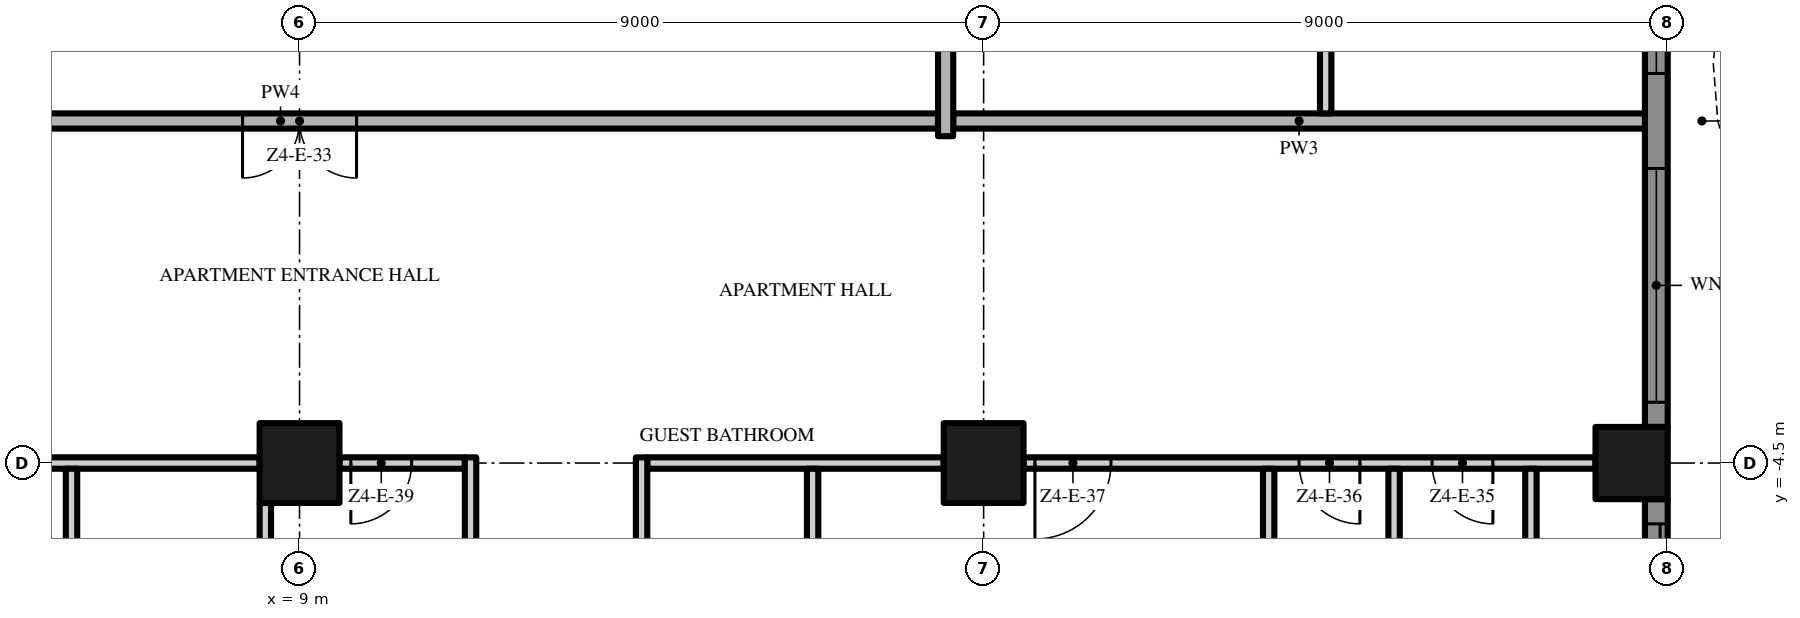
"""IFC4 building model, lengths in metres.
Left out: names, types, materials, properties, quantities, classifications, styles, units other than length and angle.
Written with IfcOpenShell. Run it as: python <this file> out.ifc"""

import sys

from ifc_helpers import new_model, si_unit, direction, frame, frame_2d, origin, origin_2d, place, context, subcontext, project, spatial, polyline, rectangle, outline, extrude, element, fill, save


model = new_model("IFC4")
c1 = context("Model", 3, precision=1e-05, world=origin(), true_north=direction((0.0, 1.0)))
c2 = subcontext(c1, "Body", "Model", "MODEL_VIEW")
j1 = project(units=[si_unit("LENGTHUNIT", "METRE"), si_unit("PLANEANGLEUNIT", "RADIAN")], contexts=[c1])
p1 = place(None, origin())
s1 = spatial("IfcSite", under=j1, at=p1, CompositionType="ELEMENT")
p2 = place(p1, origin())
s2 = spatial("IfcBuilding", under=s1, at=p2, CompositionType="ELEMENT")
p3 = place(p2, frame((0.0, 0.0, 226.2)))
s3 = spatial("IfcBuildingStorey", under=s2, at=p3, CompositionType="ELEMENT", Elevation=226.2)
p4 = place(p3, frame((18.0, -4.5, 0.0), z_axis=(0.0, 0.0, 1.0), x_axis=(1.0, 0.0, 0.0)))
e1 = element("IfcColumn", 1, at=p4, inside=s3, PredefinedType="COLUMN", context=c2, shape_type="SweptSolid", body=[
    extrude(rectangle(XDim=1.05, YDim=1.05, at=origin_2d()), origin(), (0.0, 0.0, 1.0), 3.5),
])
p5 = place(p3, frame((26.525, -4.5, 0.0), z_axis=(0.0, 0.0, 1.0), x_axis=(1.0, 0.0, 0.0)))
e2 = element("IfcColumn", 2, at=p5, inside=s3, PredefinedType="COLUMN", context=c2, shape_type="SweptSolid", body=[
    extrude(rectangle(XDim=0.95, YDim=0.95, at=origin_2d()), origin(), (0.0, 0.0, 1.0), 3.5),
])
p6 = place(p3, frame((9.0, -4.5, 0.0), z_axis=(0.0, 0.0, 1.0), x_axis=(1.0, 0.0, 0.0)))
e3 = element("IfcColumn", 3, at=p6, inside=s3, PredefinedType="COLUMN", context=c2, shape_type="SweptSolid", body=[
    extrude(rectangle(XDim=1.05, YDim=1.05, at=origin_2d()), origin(), (0.0, 0.0, 1.0), 3.5),
])
p7 = place(p3, frame((26.85, -4.975, 0.0), z_axis=(0.0, 0.0, 1.0), x_axis=(0.0, -1.0, 0.0)))
e4 = element("IfcWall", 4, at=p7, inside=s3, PredefinedType="SOLIDWALL", context=c2, shape_type="SweptSolid", body=[
    extrude(rectangle(XDim=8.05, YDim=0.3, at=frame_2d((4.025, 0.0))), origin(), (0.0, 0.0, 1.0), 3.5),
])
p8 = place(p7, frame((4.65, 0.0, 0.45)))
e5 = element("IfcOpeningElement", 5, at=p8, cuts=e4, PredefinedType="OPENING", context=c2, shape_type="SweptSolid", body=[
    extrude(rectangle(XDim=3.075, YDim=2.65, at=frame_2d((1.538, 1.325))), frame((0.0, 0.16, 0.0), z_axis=(0.0, -1.0, 0.0), x_axis=(1.0, 0.0, 0.0)), (0.0, 0.0, 1.0), 0.32),
])
p9 = place(p7, frame((0.325, 0.0, 0.0)))
e6 = element("IfcOpeningElement", 6, at=p9, cuts=e4, PredefinedType="OPENING", context=c2, shape_type="SweptSolid", body=[
    extrude(rectangle(XDim=3.075, YDim=2.4, at=frame_2d((1.538, 1.2))), frame((0.0, 0.16, 0.0), z_axis=(0.0, -1.0, 0.0), x_axis=(1.0, 0.0, 0.0)), (0.0, 0.0, 1.0), 0.32),
])
p10 = place(p3, frame((26.85, 4.025, 0.0), z_axis=(0.0, 0.0, 1.0), x_axis=(0.0, -1.0, 0.0)))
e7 = element("IfcWall", 7, at=p10, inside=s3, PredefinedType="SOLIDWALL", context=c2, shape_type="SweptSolid", body=[
    extrude(rectangle(XDim=8.05, YDim=0.3, at=frame_2d((4.025, 0.0))), origin(), (0.0, 0.0, 1.0), 3.5),
])
p11 = place(p10, frame((4.65, 0.0, 0.45)))
e8 = element("IfcOpeningElement", 8, at=p11, cuts=e7, PredefinedType="OPENING", context=c2, shape_type="SweptSolid", body=[
    extrude(rectangle(XDim=3.075, YDim=2.65, at=frame_2d((1.538, 1.325))), frame((0.0, 0.16, 0.0), z_axis=(0.0, -1.0, 0.0), x_axis=(1.0, 0.0, 0.0)), (0.0, 0.0, 1.0), 0.32),
])
p12 = place(p10, frame((0.325, 0.0, 0.45)))
e9 = element("IfcOpeningElement", 9, at=p12, cuts=e7, PredefinedType="OPENING", context=c2, shape_type="SweptSolid", body=[
    extrude(rectangle(XDim=3.075, YDim=2.65, at=frame_2d((1.538, 1.325))), frame((0.0, 0.16, 0.0), z_axis=(0.0, -1.0, 0.0), x_axis=(1.0, 0.0, 0.0)), (0.0, 0.0, 1.0), 0.32),
])
p13 = place(p3, origin())
e10 = element("IfcWall", 10, at=p13, inside=s3, PredefinedType="USERDEFINED", context=c2, shape_type="SweptSolid", body=[
    extrude(outline(polyline([(28.8, -18.0), (28.095, -16.5), (27.659, -15.0), (27.6, -14.25), (27.659, -13.5), (28.095, -12.0), (28.8, -10.5), (29.505, -9.0), (29.941, -7.5), (30.0, -6.75), (29.941, -6.0), (29.505, -4.5), (28.8, -3.0), (28.095, -1.5), (27.659, 0.0), (27.6, 0.75), (27.659, 1.5), (28.095, 3.0), (28.8, 4.5), (29.505, 6.0), (29.941, 7.5), (30.0, 8.25), (29.941, 9.0), (29.505, 10.5), (28.8, 12.0), (28.095, 13.5), (27.659, 15.0), (27.6, 15.75), (27.659, 16.5), (28.095, 18.0), (27.855, 18.07), (27.411, 16.545), (27.349, 15.75), (27.411, 14.955), (27.86, 13.411), (28.574, 11.894), (29.271, 10.411), (29.694, 8.955), (29.749, 8.25), (29.694, 7.545), (29.271, 6.089), (28.574, 4.606), (27.86, 3.089), (27.411, 1.545), (27.349, 0.75), (27.411, -0.045), (27.86, -1.589), (28.574, -3.106), (29.271, -4.589), (29.694, -6.045), (29.749, -6.75), (29.694, -7.455), (29.271, -8.911), (28.574, -10.394), (27.86, -11.911), (27.411, -13.455), (27.349, -14.25), (27.411, -15.045), (27.86, -16.589), (28.574, -18.106), (28.8, -18.0)])), origin(), (0.0, 0.0, 1.0), 0.9),
])
p14 = place(p3, frame((8.475, -4.5, 0.0), z_axis=(0.0, 0.0, 1.0), x_axis=(-1.0, 0.0, 0.0)))
e11 = element("IfcWall", 11, at=p14, inside=s3, PredefinedType="PARTITIONING", context=c2, shape_type="SweptSolid", body=[
    extrude(rectangle(XDim=7.95, YDim=0.15, at=frame_2d((3.975, 0.0))), origin(), (0.0, 0.0, 1.0), 3.5),
])
p15 = place(p14, frame((3.575, 0.0, 0.0)))
e12 = element("IfcOpeningElement", 12, at=p15, cuts=e11, PredefinedType="OPENING", context=c2, shape_type="SweptSolid", body=[
    extrude(rectangle(XDim=0.8, YDim=2.0, at=frame_2d((0.4, 1.0))), frame((0.0, 0.085, 0.0), z_axis=(0.0, -1.0, 0.0), x_axis=(1.0, 0.0, 0.0)), (0.0, 0.0, 1.0), 0.17),
])
p16 = place(p14, frame((6.55, 0.0, 0.0)))
e13 = element("IfcOpeningElement", 13, at=p16, cuts=e11, PredefinedType="OPENING", context=c2, shape_type="SweptSolid", body=[
    extrude(rectangle(XDim=0.9, YDim=2.1, at=frame_2d((0.45, 1.05))), frame((0.0, 0.085, 0.0), z_axis=(0.0, -1.0, 0.0), x_axis=(1.0, 0.0, 0.0)), (0.0, 0.0, 1.0), 0.17),
])
p17 = place(p3, frame((11.175, -4.5, 0.0), z_axis=(0.0, 0.0, 1.0), x_axis=(-1.0, 0.0, 0.0)))
e14 = element("IfcWall", 14, at=p17, inside=s3, PredefinedType="PARTITIONING", context=c2, shape_type="SweptSolid", body=[
    extrude(rectangle(XDim=1.65, YDim=0.15, at=frame_2d((0.825, 0.0))), origin(), (0.0, 0.0, 1.0), 3.5),
])
p18 = place(p17, frame((0.7, 0.0, 0.0)))
e15 = element("IfcOpeningElement", 15, at=p18, cuts=e14, PredefinedType="OPENING", context=c2, shape_type="SweptSolid", body=[
    extrude(rectangle(XDim=0.8, YDim=2.0, at=frame_2d((0.4, 1.0))), frame((0.0, 0.085, 0.0), z_axis=(0.0, -1.0, 0.0), x_axis=(1.0, 0.0, 0.0)), (0.0, 0.0, 1.0), 0.17),
])
p19 = place(p3, frame((13.575, -4.5, 0.0), z_axis=(0.0, 0.0, 1.0), x_axis=(1.0, 0.0, 0.0)))
e16 = element("IfcWall", 16, at=p19, inside=s3, PredefinedType="PARTITIONING", context=c2, shape_type="SweptSolid", body=[
    extrude(rectangle(XDim=3.9, YDim=0.15, at=frame_2d((1.95, 0.0))), origin(), (0.0, 0.0, 1.0), 3.5),
])
p20 = place(p3, frame((26.05, -4.5, 0.0), z_axis=(0.0, 0.0, 1.0), x_axis=(-1.0, 0.0, 0.0)))
e17 = element("IfcWall", 17, at=p20, inside=s3, PredefinedType="PARTITIONING", context=c2, shape_type="SweptSolid", body=[
    extrude(rectangle(XDim=7.525, YDim=0.15, at=frame_2d((3.763, 0.0))), origin(), (0.0, 0.0, 1.0), 3.5),
])
p21 = place(p20, frame((1.35, 0.0, 0.0)))
e18 = element("IfcOpeningElement", 18, at=p21, cuts=e17, PredefinedType="OPENING", context=c2, shape_type="SweptSolid", body=[
    extrude(rectangle(XDim=0.8, YDim=2.0, at=frame_2d((0.4, 1.0))), frame((0.0, 0.085, 0.0), z_axis=(0.0, -1.0, 0.0), x_axis=(1.0, 0.0, 0.0)), (0.0, 0.0, 1.0), 0.17),
])
p22 = place(p20, frame((3.1, 0.0, 0.0)))
e19 = element("IfcOpeningElement", 19, at=p22, cuts=e17, PredefinedType="OPENING", context=c2, shape_type="SweptSolid", body=[
    extrude(rectangle(XDim=0.8, YDim=2.0, at=frame_2d((0.4, 1.0))), frame((0.0, 0.085, 0.0), z_axis=(0.0, -1.0, 0.0), x_axis=(1.0, 0.0, 0.0)), (0.0, 0.0, 1.0), 0.17),
])
p23 = place(p20, frame((6.375, 0.0, 0.0)))
e20 = element("IfcOpeningElement", 20, at=p23, cuts=e17, PredefinedType="OPENING", context=c2, shape_type="SweptSolid", body=[
    extrude(rectangle(XDim=1.0, YDim=2.4, at=frame_2d((0.5, 1.2))), frame((0.0, 0.085, 0.0), z_axis=(0.0, -1.0, 0.0), x_axis=(1.0, 0.0, 0.0)), (0.0, 0.0, 1.0), 0.17),
])
p24 = place(p3, frame((17.4, 0.0, 0.0), z_axis=(0.0, 0.0, 1.0), x_axis=(-1.0, 0.0, 0.0)))
e21 = element("IfcWall", 21, at=p24, inside=s3, PredefinedType="PARTITIONING", context=c2, shape_type="SweptSolid", body=[
    extrude(rectangle(XDim=17.3, YDim=0.2, at=frame_2d((8.65, 0.0))), origin(), (0.0, 0.0, 1.0), 3.5),
])
p25 = place(p24, frame((7.65, 0.0, 0.0)))
e22 = element("IfcOpeningElement", 22, at=p25, cuts=e21, PredefinedType="OPENING", context=c2, shape_type="SweptSolid", body=[
    extrude(rectangle(XDim=1.5, YDim=2.4, at=frame_2d((0.75, 1.2))), frame((0.0, 0.11, 0.0), z_axis=(0.0, -1.0, 0.0), x_axis=(1.0, 0.0, 0.0)), (0.0, 0.0, 1.0), 0.22),
])
p26 = place(p3, frame((17.6, 0.0, 0.0), z_axis=(0.0, 0.0, 1.0), x_axis=(1.0, 0.0, 0.0)))
e23 = element("IfcWall", 23, at=p26, inside=s3, PredefinedType="PARTITIONING", context=c2, shape_type="SweptSolid", body=[
    extrude(rectangle(XDim=9.1, YDim=0.2, at=frame_2d((4.55, 0.0))), origin(), (0.0, 0.0, 1.0), 3.5),
])
p27 = place(p3, frame((6.0, -8.925, 0.0), z_axis=(0.0, 0.0, 1.0), x_axis=(0.0, 1.0, 0.0)))
e24 = element("IfcWall", 24, at=p27, inside=s3, PredefinedType="PARTITIONING", context=c2, shape_type="SweptSolid", body=[
    extrude(rectangle(XDim=4.35, YDim=0.15, at=frame_2d((2.175, 0.0))), origin(), (0.0, 0.0, 1.0), 3.5),
])
p28 = place(p3, frame((8.55, -8.925, 0.0), z_axis=(0.0, 0.0, 1.0), x_axis=(0.0, 1.0, 0.0)))
e25 = element("IfcWall", 25, at=p28, inside=s3, PredefinedType="PARTITIONING", context=c2, shape_type="SweptSolid", body=[
    extrude(rectangle(XDim=3.9, YDim=0.15, at=frame_2d((1.95, 0.0))), origin(), (0.0, 0.0, 1.0), 3.5),
])
p29 = place(p3, frame((11.25, -9.075, 0.0), z_axis=(0.0, 0.0, 1.0), x_axis=(0.0, 1.0, 0.0)))
e26 = element("IfcWall", 26, at=p29, inside=s3, PredefinedType="PARTITIONING", context=c2, shape_type="SweptSolid", body=[
    extrude(rectangle(XDim=4.65, YDim=0.15, at=frame_2d((2.325, 0.0))), origin(), (0.0, 0.0, 1.0), 3.5),
])
p30 = place(p3, frame((13.5, -4.425, 0.0), z_axis=(0.0, 0.0, 1.0), x_axis=(0.0, -1.0, 0.0)))
e27 = element("IfcWall", 27, at=p30, inside=s3, PredefinedType="PARTITIONING", context=c2, shape_type="SweptSolid", body=[
    extrude(rectangle(XDim=4.65, YDim=0.15, at=frame_2d((2.325, 0.0))), origin(), (0.0, 0.0, 1.0), 3.5),
])
p31 = place(p30, frame((1.875, 0.0, 0.0)))
e28 = element("IfcOpeningElement", 28, at=p31, cuts=e27, PredefinedType="OPENING", context=c2, shape_type="SweptSolid", body=[
    extrude(rectangle(XDim=0.9, YDim=2.1, at=frame_2d((0.45, 1.05))), frame((0.0, 0.085, 0.0), z_axis=(0.0, -1.0, 0.0), x_axis=(1.0, 0.0, 0.0)), (0.0, 0.0, 1.0), 0.17),
])
p32 = place(p3, frame((15.75, -8.925, 0.0), z_axis=(0.0, 0.0, 1.0), x_axis=(0.0, 1.0, 0.0)))
e29 = element("IfcWall", 29, at=p32, inside=s3, PredefinedType="PARTITIONING", context=c2, shape_type="SweptSolid", body=[
    extrude(rectangle(XDim=4.35, YDim=0.15, at=frame_2d((2.175, 0.0))), origin(), (0.0, 0.0, 1.0), 3.5),
])
p33 = place(p3, frame((17.5, -0.2, 0.0), z_axis=(0.0, 0.0, 1.0), x_axis=(0.0, 1.0, 0.0)))
e30 = element("IfcWall", 30, at=p33, inside=s3, PredefinedType="PARTITIONING", context=c2, shape_type="SweptSolid", body=[
    extrude(rectangle(XDim=4.175, YDim=0.2, at=frame_2d((2.087, 0.0))), origin(), (0.0, 0.0, 1.0), 3.5),
])
p34 = place(p3, frame((21.75, -8.925, 0.0), z_axis=(0.0, 0.0, 1.0), x_axis=(0.0, 1.0, 0.0)))
e31 = element("IfcWall", 31, at=p34, inside=s3, PredefinedType="PARTITIONING", context=c2, shape_type="SweptSolid", body=[
    extrude(rectangle(XDim=4.35, YDim=0.15, at=frame_2d((2.175, 0.0))), origin(), (0.0, 0.0, 1.0), 3.5),
])
p35 = place(p3, frame((22.5, 17.525, 0.0), z_axis=(0.0, 0.0, 1.0), x_axis=(0.0, -1.0, 0.0)))
e32 = element("IfcWall", 32, at=p35, inside=s3, PredefinedType="PARTITIONING", context=c2, shape_type="SweptSolid", body=[
    extrude(rectangle(XDim=17.425, YDim=0.15, at=frame_2d((8.713, 0.0))), origin(), (0.0, 0.0, 1.0), 3.5),
])
p36 = place(p35, frame((14.775, 0.0, 0.0)))
e33 = element("IfcOpeningElement", 33, at=p36, cuts=e32, PredefinedType="OPENING", context=c2, shape_type="SweptSolid", body=[
    extrude(rectangle(XDim=1.0, YDim=2.4, at=frame_2d((0.5, 1.2))), frame((0.0, 0.085, 0.0), z_axis=(0.0, -1.0, 0.0), x_axis=(1.0, 0.0, 0.0)), (0.0, 0.0, 1.0), 0.17),
])
p37 = place(p35, frame((9.175, 0.0, 0.0)))
e34 = element("IfcOpeningElement", 34, at=p37, cuts=e32, PredefinedType="OPENING", context=c2, shape_type="SweptSolid", body=[
    extrude(rectangle(XDim=1.0, YDim=2.4, at=frame_2d((0.5, 1.2))), frame((0.0, 0.085, 0.0), z_axis=(0.0, -1.0, 0.0), x_axis=(1.0, 0.0, 0.0)), (0.0, 0.0, 1.0), 0.17),
])
p38 = place(p35, frame((6.925, 0.0, 0.0)))
e35 = element("IfcOpeningElement", 35, at=p38, cuts=e32, PredefinedType="OPENING", context=c2, shape_type="SweptSolid", body=[
    extrude(rectangle(XDim=1.0, YDim=2.4, at=frame_2d((0.5, 1.2))), frame((0.0, 0.085, 0.0), z_axis=(0.0, -1.0, 0.0), x_axis=(1.0, 0.0, 0.0)), (0.0, 0.0, 1.0), 0.17),
])
for number, where, z_axis, x_axis in (
    (36, (23.4, -8.925, 0.0), (0.0, 0.0, 1.0), (0.0, 1.0, 0.0)),
    (37, (25.2, -8.925, 0.0), (0.0, 0.0, 1.0), (0.0, 1.0, 0.0)),
):
    element("IfcWall", number, at=place(p3, frame(where, z_axis=z_axis, x_axis=x_axis)), inside=s3, PredefinedType="PARTITIONING", context=c2, shape_type="SweptSolid", body=[
        extrude(rectangle(XDim=4.35, YDim=0.15, at=frame_2d((2.175, 0.0))), origin(), (0.0, 0.0, 1.0), 3.5),
    ])
p39 = place(p9, origin())
e38 = element("IfcDoor", 38, at=p39, inside=s3, OperationType="SINGLE_SWING_LEFT", PredefinedType="DOOR", context=c2, shape_type="SweptSolid", body=[
    extrude(rectangle(XDim=3.075, YDim=2.4, at=frame_2d((1.538, 1.2))), frame((0.0, 0.025, 0.0), z_axis=(0.0, -1.0, 0.0), x_axis=(1.0, 0.0, 0.0)), (0.0, 0.0, 1.0), 0.05),
])
fill(e6, e38)
p40 = place(p11, origin())
e39 = element("IfcWindow", 39, at=p40, inside=s3, PartitioningType="SINGLE_PANEL", PredefinedType="WINDOW", context=c2, shape_type="SweptSolid", body=[
    extrude(rectangle(XDim=3.075, YDim=2.65, at=frame_2d((1.538, 1.325))), frame((0.0, 0.03, 0.0), z_axis=(0.0, -1.0, 0.0), x_axis=(1.0, 0.0, 0.0)), (0.0, 0.0, 1.0), 0.06),
])
fill(e8, e39)
p41 = place(p12, origin())
e40 = element("IfcWindow", 40, at=p41, inside=s3, PartitioningType="SINGLE_PANEL", PredefinedType="WINDOW", context=c2, shape_type="SweptSolid", body=[
    extrude(rectangle(XDim=3.075, YDim=2.65, at=frame_2d((1.538, 1.325))), frame((0.0, 0.03, 0.0), z_axis=(0.0, -1.0, 0.0), x_axis=(1.0, 0.0, 0.0)), (0.0, 0.0, 1.0), 0.06),
])
fill(e9, e40)
p42 = place(p25, origin())
e41 = element("IfcDoor", 41, at=p42, inside=s3, OperationType="DOUBLE_DOOR_SINGLE_SWING", PredefinedType="DOOR", context=c2, shape_type="SweptSolid", body=[
    extrude(rectangle(XDim=1.5, YDim=2.4, at=frame_2d((0.75, 1.2))), frame((0.0, 0.025, 0.0), z_axis=(0.0, -1.0, 0.0), x_axis=(1.0, 0.0, 0.0)), (0.0, 0.0, 1.0), 0.05),
])
fill(e22, e41)
p43 = place(p21, origin())
e42 = element("IfcDoor", 42, at=p43, inside=s3, OperationType="SINGLE_SWING_LEFT", PredefinedType="DOOR", context=c2, shape_type="SweptSolid", body=[
    extrude(rectangle(XDim=0.8, YDim=2.0, at=frame_2d((0.4, 1.0))), frame((0.0, 0.025, 0.0), z_axis=(0.0, -1.0, 0.0), x_axis=(1.0, 0.0, 0.0)), (0.0, 0.0, 1.0), 0.05),
])
fill(e18, e42)
p44 = place(p22, origin())
e43 = element("IfcDoor", 43, at=p44, inside=s3, OperationType="SINGLE_SWING_LEFT", PredefinedType="DOOR", context=c2, shape_type="SweptSolid", body=[
    extrude(rectangle(XDim=0.8, YDim=2.0, at=frame_2d((0.4, 1.0))), frame((0.0, 0.025, 0.0), z_axis=(0.0, -1.0, 0.0), x_axis=(1.0, 0.0, 0.0)), (0.0, 0.0, 1.0), 0.05),
])
fill(e19, e43)
p45 = place(p23, origin())
e44 = element("IfcDoor", 44, at=p45, inside=s3, OperationType="SINGLE_SWING_RIGHT", PredefinedType="DOOR", context=c2, shape_type="SweptSolid", body=[
    extrude(rectangle(XDim=1.0, YDim=2.4, at=frame_2d((0.5, 1.2))), frame((0.0, 0.025, 0.0), z_axis=(0.0, -1.0, 0.0), x_axis=(1.0, 0.0, 0.0)), (0.0, 0.0, 1.0), 0.05),
])
fill(e20, e44)
p46 = place(p18, origin())
e45 = element("IfcDoor", 45, at=p46, inside=s3, OperationType="SINGLE_SWING_RIGHT", PredefinedType="DOOR", context=c2, shape_type="SweptSolid", body=[
    extrude(rectangle(XDim=0.8, YDim=2.0, at=frame_2d((0.4, 1.0))), frame((0.0, 0.025, 0.0), z_axis=(0.0, -1.0, 0.0), x_axis=(1.0, 0.0, 0.0)), (0.0, 0.0, 1.0), 0.05),
])
fill(e15, e45)
save(model, sys.argv[1])
